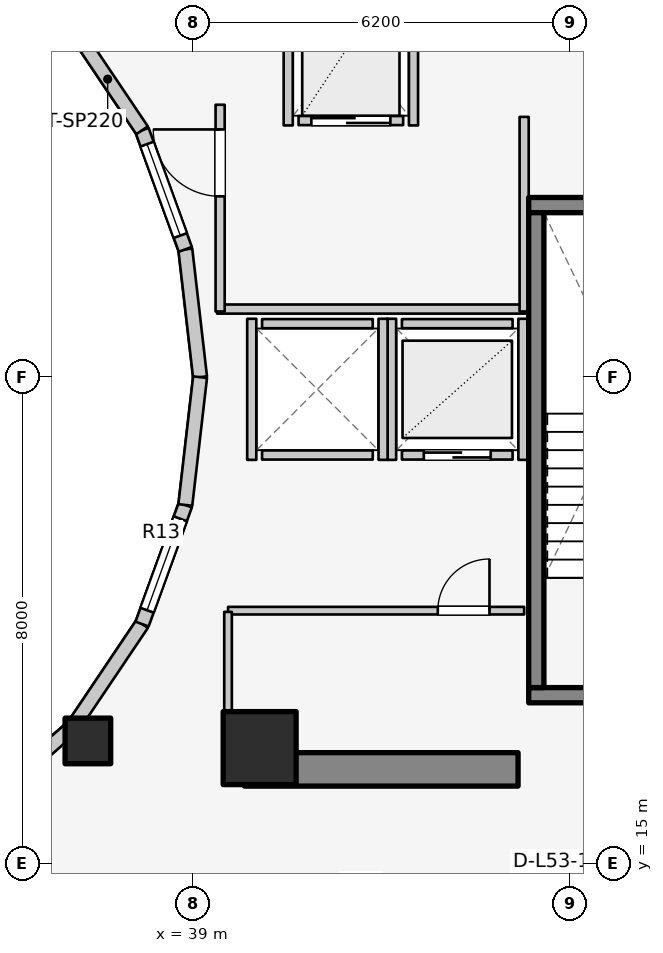
"""IFC4 building model, lengths in metres.
Left out: names, types, materials, properties, quantities, classifications, styles, units other than length and angle.
Written with IfcOpenShell. Run it as: python <this file> out.ifc"""

import sys

from ifc_helpers import new_model, si_unit, direction, frame, frame_2d, origin, origin_2d, place, context, subcontext, project, spatial, rectangle, extrude, element, fill, save


model = new_model("IFC4")
c1 = context("Model", 3, precision=1e-05, world=origin(), true_north=direction((0.0, 1.0)))
c2 = subcontext(c1, "Body", "Model", "MODEL_VIEW")
j1 = project(units=[si_unit("LENGTHUNIT", "METRE"), si_unit("PLANEANGLEUNIT", "RADIAN")], contexts=[c1])
p1 = place(None, origin())
s1 = spatial("IfcSite", under=j1, at=p1, CompositionType="ELEMENT")
p2 = place(p1, origin())
s2 = spatial("IfcBuilding", under=s1, at=p2, CompositionType="ELEMENT")
p3 = place(p2, frame((0.0, 0.0, 174.6)))
s3 = spatial("IfcBuildingStorey", under=s2, at=p3, CompositionType="ELEMENT", Elevation=174.6)
p4 = place(p3, frame((39.85, 16.55, 0.0), z_axis=(0.0, 0.0, 1.0), x_axis=(1.0, 0.0, 0.0)))
e1 = element("IfcWall", 1, at=p4, inside=s3, PredefinedType="SHEAR", context=c2, shape_type="SweptSolid", body=[
    extrude(rectangle(XDim=4.5, YDim=0.55, at=frame_2d((2.25, 0.0))), origin(), (0.0, 0.0, 1.0), 3.1),
])
p5 = place(p3, frame((44.525, 17.77, 0.0), z_axis=(0.0, 0.0, 1.0), x_axis=(1.0, 0.0, 0.0)))
e2 = element("IfcWall", 2, at=p5, inside=s3, PredefinedType="SOLIDWALL", context=c2, shape_type="SweptSolid", body=[
    extrude(rectangle(XDim=3.37, YDim=0.25, at=frame_2d((1.685, 0.0))), origin(), (0.0, 0.0, 1.0), 3.1),
])
p6 = place(p5, frame((1.135, 0.0, 0.0)))
e3 = element("IfcOpeningElement", 3, at=p6, cuts=e2, PredefinedType="OPENING", context=c2, shape_type="SweptSolid", body=[
    extrude(rectangle(XDim=1.1, YDim=2.1, at=frame_2d((0.55, 1.05))), frame((0.0, 0.135, 0.0), z_axis=(0.0, -1.0, 0.0), x_axis=(1.0, 0.0, 0.0)), (0.0, 0.0, 1.0), 0.27),
])
p7 = place(p3, frame((44.525, 25.83, 0.0), z_axis=(0.0, 0.0, 1.0), x_axis=(1.0, 0.0, 0.0)))
e4 = element("IfcWall", 4, at=p7, inside=s3, PredefinedType="SOLIDWALL", context=c2, shape_type="SweptSolid", body=[
    extrude(rectangle(XDim=3.37, YDim=0.25, at=frame_2d((1.685, 0.0))), origin(), (0.0, 0.0, 1.0), 3.1),
])
p8 = place(p3, frame((44.65, 17.895, 0.0), z_axis=(0.0, 0.0, 1.0), x_axis=(0.0, 1.0, 0.0)))
e5 = element("IfcWall", 5, at=p8, inside=s3, PredefinedType="SOLIDWALL", context=c2, shape_type="SweptSolid", body=[
    extrude(rectangle(XDim=7.81, YDim=0.25, at=frame_2d((3.905, 0.0))), origin(), (0.0, 0.0, 1.0), 3.1),
])
p9 = place(p3, frame((40.1, 16.9, 0.0), z_axis=(0.0, 0.0, 1.0), x_axis=(1.0, 0.0, 0.0)))
e6 = element("IfcColumn", 6, at=p9, inside=s3, PredefinedType="COLUMN", context=c2, shape_type="SweptSolid", body=[
    extrude(rectangle(XDim=1.2, YDim=1.2, at=origin_2d()), origin(), (0.0, 0.0, 1.0), 3.1),
])
p10 = place(p3, frame((37.275, 17.018, 0.0), z_axis=(0.0, 0.0, 1.0), x_axis=(1.0, 0.0, 0.0)))
e7 = element("IfcColumn", 7, at=p10, inside=s3, PredefinedType="COLUMN", context=c2, shape_type="SweptSolid", body=[
    extrude(rectangle(XDim=0.75, YDim=0.75, at=origin_2d()), origin(), (0.0, 0.0, 1.0), 3.1),
])
p11 = place(p3, frame((39.12, 23.0, 0.0), z_axis=(0.0, 0.0, 1.0), x_axis=(-0.114711713601, 0.993398823617, 0.0)))
e8 = element("IfcWall", 8, at=p11, inside=s3, PredefinedType="STANDARD", context=c2, shape_type="SweptSolid", body=[
    extrude(rectangle(XDim=2.115, YDim=0.23, at=frame_2d((1.058, 0.0))), origin(), (0.0, 0.0, 1.0), 2.84),
])
p12 = place(p3, frame((38.877, 25.102, 0.0), z_axis=(0.0, 0.0, 1.0), x_axis=(-0.341423187295, 0.93990968033, 0.0)))
e9 = element("IfcWall", 9, at=p12, inside=s3, PredefinedType="STANDARD", context=c2, shape_type="SweptSolid", body=[
    extrude(rectangle(XDim=2.084, YDim=0.23, at=frame_2d((1.042, 0.0))), origin(), (0.0, 0.0, 1.0), 2.84),
])
p13 = place(p12, frame((0.242, 0.0, 0.85)))
e10 = element("IfcOpeningElement", 10, at=p13, cuts=e9, PredefinedType="OPENING", context=c2, shape_type="SweptSolid", body=[
    extrude(rectangle(XDim=1.6, YDim=1.65, at=frame_2d((0.8, 0.825))), frame((0.0, 0.125, 0.0), z_axis=(0.0, -1.0, 0.0), x_axis=(1.0, 0.0, 0.0)), (0.0, 0.0, 1.0), 0.25),
])
p14 = place(p3, frame((38.166, 27.06, 0.0), z_axis=(0.0, 0.0, 1.0), x_axis=(-0.558197800898, 0.829707909492, 0.0)))
e11 = element("IfcWall", 11, at=p14, inside=s3, PredefinedType="STANDARD", context=c2, shape_type="SweptSolid", body=[
    extrude(rectangle(XDim=2.027, YDim=0.23, at=frame_2d((1.013, 0.0))), origin(), (0.0, 0.0, 1.0), 2.16),
])
p15 = place(p3, frame((35.56, 15.968, 0.0), z_axis=(0.0, 0.0, 1.0), x_axis=(0.752576694707, 0.658504607869, 0.0)))
e12 = element("IfcWall", 12, at=p15, inside=s3, PredefinedType="STANDARD", context=c2, shape_type="SweptSolid", body=[
    extrude(rectangle(XDim=1.959, YDim=0.23, at=frame_2d((0.98, 0.0))), origin(), (0.0, 0.0, 1.0), 2.16),
])
p16 = place(p3, frame((37.035, 17.258, 0.0), z_axis=(0.0, 0.0, 1.0), x_axis=(0.558197800898, 0.829707909492, 0.0)))
e13 = element("IfcWall", 13, at=p16, inside=s3, PredefinedType="STANDARD", context=c2, shape_type="SweptSolid", body=[
    extrude(rectangle(XDim=2.027, YDim=0.23, at=frame_2d((1.013, 0.0))), origin(), (0.0, 0.0, 1.0), 2.16),
])
p17 = place(p3, frame((38.166, 18.94, 0.0), z_axis=(0.0, 0.0, 1.0), x_axis=(0.341423187295, 0.93990968033, 0.0)))
e14 = element("IfcWall", 14, at=p17, inside=s3, PredefinedType="STANDARD", context=c2, shape_type="SweptSolid", body=[
    extrude(rectangle(XDim=2.084, YDim=0.23, at=frame_2d((1.042, 0.0))), origin(), (0.0, 0.0, 1.0), 2.84),
])
p18 = place(p17, frame((0.242, 0.0, 0.85)))
e15 = element("IfcOpeningElement", 15, at=p18, cuts=e14, PredefinedType="OPENING", context=c2, shape_type="SweptSolid", body=[
    extrude(rectangle(XDim=1.6, YDim=1.65, at=frame_2d((0.8, 0.825))), frame((0.0, 0.125, 0.0), z_axis=(0.0, -1.0, 0.0), x_axis=(1.0, 0.0, 0.0)), (0.0, 0.0, 1.0), 0.25),
])
p19 = place(p3, frame((38.877, 20.898, 0.0), z_axis=(0.0, 0.0, 1.0), x_axis=(0.114711713601, 0.993398823617, 0.0)))
e16 = element("IfcWall", 16, at=p19, inside=s3, PredefinedType="STANDARD", context=c2, shape_type="SweptSolid", body=[
    extrude(rectangle(XDim=2.115, YDim=0.23, at=frame_2d((1.058, 0.0))), origin(), (0.0, 0.0, 1.0), 2.84),
])
p20 = place(p3, frame((42.44, 21.72, 0.0), z_axis=(0.0, 0.0, 1.0), x_axis=(1.0, 0.0, 0.0)))
e17 = element("IfcWall", 17, at=p20, inside=s3, PredefinedType="SOLIDWALL", context=c2, shape_type="SweptSolid", body=[
    extrude(rectangle(XDim=1.82, YDim=0.15, at=frame_2d((0.91, 0.0))), origin(), (0.0, 0.0, 1.0), 2.855),
])
p21 = place(p20, frame((0.36, 0.0, 0.0)))
e18 = element("IfcOpeningElement", 18, at=p21, cuts=e17, PredefinedType="OPENING", context=c2, shape_type="SweptSolid", body=[
    extrude(rectangle(XDim=1.1, YDim=2.1, at=frame_2d((0.55, 1.05))), frame((0.0, 0.085, 0.0), z_axis=(0.0, -1.0, 0.0), x_axis=(1.0, 0.0, 0.0)), (0.0, 0.0, 1.0), 0.17),
])
p22 = place(p3, frame((42.44, 23.88, 0.0), z_axis=(0.0, 0.0, 1.0), x_axis=(1.0, 0.0, 0.0)))
e19 = element("IfcWall", 19, at=p22, inside=s3, PredefinedType="SOLIDWALL", context=c2, shape_type="SweptSolid", body=[
    extrude(rectangle(XDim=1.82, YDim=0.15, at=frame_2d((0.91, 0.0))), origin(), (0.0, 0.0, 1.0), 2.855),
])
for number, where, z_axis, x_axis in (
    (20, (42.27, 21.64, 0.0), (0.0, 0.0, 1.0), (0.0, 1.0, 0.0)),
    (21, (44.43, 21.64, 0.0), (0.0, 0.0, 1.0), (0.0, 1.0, 0.0)),
):
    element("IfcWall", number, at=place(p3, frame(where, z_axis=z_axis, x_axis=x_axis)), inside=s3, PredefinedType="SOLIDWALL", context=c2, shape_type="SweptSolid", body=[
        extrude(rectangle(XDim=2.32, YDim=0.15, at=frame_2d((1.16, 0.0))), origin(), (0.0, 0.0, 1.0), 2.855),
    ])
for number, where, z_axis, x_axis in (
    (22, (40.14, 21.72, 0.0), (0.0, 0.0, 1.0), (1.0, 0.0, 0.0)),
    (23, (40.14, 23.88, 0.0), (0.0, 0.0, 1.0), (1.0, 0.0, 0.0)),
):
    element("IfcWall", number, at=place(p3, frame(where, z_axis=z_axis, x_axis=x_axis)), inside=s3, PredefinedType="SOLIDWALL", context=c2, shape_type="SweptSolid", body=[
        extrude(rectangle(XDim=1.82, YDim=0.15, at=frame_2d((0.91, 0.0))), origin(), (0.0, 0.0, 1.0), 2.12),
    ])
p23 = place(p3, frame((39.97, 21.64, 0.0), z_axis=(0.0, 0.0, 1.0), x_axis=(0.0, 1.0, 0.0)))
e24 = element("IfcWall", 24, at=p23, inside=s3, PredefinedType="SOLIDWALL", context=c2, shape_type="SweptSolid", body=[
    extrude(rectangle(XDim=2.32, YDim=0.15, at=frame_2d((1.16, 0.0))), origin(), (0.0, 0.0, 1.0), 2.12),
])
p24 = place(p3, frame((42.13, 21.64, 0.0), z_axis=(0.0, 0.0, 1.0), x_axis=(0.0, 1.0, 0.0)))
e25 = element("IfcWall", 25, at=p24, inside=s3, PredefinedType="SOLIDWALL", context=c2, shape_type="SweptSolid", body=[
    extrude(rectangle(XDim=2.32, YDim=0.15, at=frame_2d((1.16, 0.0))), origin(), (0.0, 0.0, 1.0), 2.855),
])
p25 = place(p3, frame((40.74, 27.22, 0.0), z_axis=(0.0, 0.0, 1.0), x_axis=(1.0, 0.0, 0.0)))
e26 = element("IfcWall", 26, at=p25, inside=s3, PredefinedType="SOLIDWALL", context=c2, shape_type="SweptSolid", body=[
    extrude(rectangle(XDim=1.72, YDim=0.15, at=frame_2d((0.86, 0.0))), origin(), (0.0, 0.0, 1.0), 2.855),
])
p26 = place(p25, frame((0.21, 0.0, 0.0)))
e27 = element("IfcOpeningElement", 27, at=p26, cuts=e26, PredefinedType="OPENING", context=c2, shape_type="SweptSolid", body=[
    extrude(rectangle(XDim=1.3, YDim=2.1, at=frame_2d((0.65, 1.05))), frame((0.0, 0.085, 0.0), z_axis=(0.0, -1.0, 0.0), x_axis=(1.0, 0.0, 0.0)), (0.0, 0.0, 1.0), 0.17),
])
for number, where, z_axis, x_axis in (
    (28, (40.57, 27.14, 0.0), (0.0, 0.0, 1.0), (0.0, 1.0, 0.0)),
    (29, (42.63, 27.14, 0.0), (0.0, 0.0, 1.0), (0.0, 1.0, 0.0)),
):
    element("IfcWall", number, at=place(p3, frame(where, z_axis=z_axis, x_axis=x_axis)), inside=s3, PredefinedType="SOLIDWALL", context=c2, shape_type="SweptSolid", body=[
        extrude(rectangle(XDim=2.72, YDim=0.15, at=frame_2d((1.36, 0.0))), origin(), (0.0, 0.0, 1.0), 2.855),
    ])
p27 = place(p3, frame((39.4, 24.12, 0.0), z_axis=(0.0, 0.0, 1.0), x_axis=(1.0, 0.0, 0.0)))
e30 = element("IfcWall", 30, at=p27, inside=s3, PredefinedType="PARTITIONING", context=c2, shape_type="SweptSolid", body=[
    extrude(rectangle(XDim=5.08, YDim=0.15, at=frame_2d((2.54, 0.0))), origin(), (0.0, 0.0, 1.0), 2.12),
])
p28 = place(p3, frame((44.45, 24.08, 0.0), z_axis=(0.0, 0.0, 1.0), x_axis=(0.0, 1.0, 0.0)))
e31 = element("IfcWall", 31, at=p28, inside=s3, PredefinedType="PARTITIONING", context=c2, shape_type="SweptSolid", body=[
    extrude(rectangle(XDim=3.2, YDim=0.15, at=frame_2d((1.6, 0.0))), origin(), (0.0, 0.0, 1.0), 2.855),
])
p29 = place(p3, frame((39.45, 24.08, 0.0), z_axis=(0.0, 0.0, 1.0), x_axis=(0.0, 1.0, 0.0)))
e32 = element("IfcWall", 32, at=p29, inside=s3, PredefinedType="PARTITIONING", context=c2, shape_type="SweptSolid", body=[
    extrude(rectangle(XDim=3.4, YDim=0.15, at=frame_2d((1.7, 0.0))), origin(), (0.0, 0.0, 1.0), 2.855),
])
p30 = place(p29, frame((1.894, 0.0, 0.0)))
e33 = element("IfcOpeningElement", 33, at=p30, cuts=e32, PredefinedType="OPENING", context=c2, shape_type="SweptSolid", body=[
    extrude(rectangle(XDim=1.1, YDim=2.1, at=frame_2d((0.55, 1.05))), frame((0.0, 0.085, 0.0), z_axis=(0.0, -1.0, 0.0), x_axis=(1.0, 0.0, 0.0)), (0.0, 0.0, 1.0), 0.17),
])
p31 = place(p3, frame((39.58, 19.16, 0.0), z_axis=(0.0, 0.0, 1.0), x_axis=(1.0, 0.0, 0.0)))
e34 = element("IfcWall", 34, at=p31, inside=s3, PredefinedType="PARTITIONING", context=c2, shape_type="SweptSolid", body=[
    extrude(rectangle(XDim=4.87, YDim=0.125, at=frame_2d((2.435, 0.0))), origin(), (0.0, 0.0, 1.0), 2.12),
])
p32 = place(p31, frame((3.45, 0.0, 0.0)))
e35 = element("IfcOpeningElement", 35, at=p32, cuts=e34, PredefinedType="OPENING", context=c2, shape_type="SweptSolid", body=[
    extrude(rectangle(XDim=0.85, YDim=2.05, at=frame_2d((0.425, 1.025))), frame((0.0, 0.073, 0.0), z_axis=(0.0, -1.0, 0.0), x_axis=(1.0, 0.0, 0.0)), (0.0, 0.0, 1.0), 0.145),
])
p33 = place(p3, frame((39.58, 17.1, 0.0), z_axis=(0.0, 0.0, 1.0), x_axis=(0.0, 1.0, 0.0)))
e36 = element("IfcWall", 36, at=p33, inside=s3, PredefinedType="PARTITIONING", context=c2, shape_type="SweptSolid", body=[
    extrude(rectangle(XDim=2.04, YDim=0.125, at=frame_2d((1.02, 0.0))), origin(), (0.0, 0.0, 1.0), 2.232),
])
p34 = place(p3, frame((35.55, 15.985, 0.0), z_axis=(0.0, 0.0, 1.0), x_axis=(0.523587550846, -0.851971875474, 0.0)))
e37 = element("IfcWall", 37, at=p34, inside=s3, PredefinedType="PARTITIONING", context=c2, shape_type="SweptSolid", body=[
    extrude(rectangle(XDim=3.153, YDim=0.125, at=frame_2d((1.577, 0.0))), origin(), (0.0, 0.0, 1.0), 2.299),
])
p35 = place(p13, origin())
e38 = element("IfcWindow", 38, at=p35, inside=s3, PartitioningType="SINGLE_PANEL", PredefinedType="WINDOW", context=c2, shape_type="SweptSolid", body=[
    extrude(rectangle(XDim=1.6, YDim=1.65, at=frame_2d((0.8, 0.825))), frame((0.0, 0.03, 0.0), z_axis=(0.0, -1.0, 0.0), x_axis=(1.0, 0.0, 0.0)), (0.0, 0.0, 1.0), 0.06),
])
fill(e10, e38)
p36 = place(p18, origin())
e39 = element("IfcWindow", 39, at=p36, inside=s3, PartitioningType="SINGLE_PANEL", PredefinedType="WINDOW", context=c2, shape_type="SweptSolid", body=[
    extrude(rectangle(XDim=1.6, YDim=1.65, at=frame_2d((0.8, 0.825))), frame((0.0, 0.03, 0.0), z_axis=(0.0, -1.0, 0.0), x_axis=(1.0, 0.0, 0.0)), (0.0, 0.0, 1.0), 0.06),
])
fill(e15, e39)
p37 = place(p21, origin())
e40 = element("IfcDoor", 40, at=p37, inside=s3, OperationType="DOUBLE_DOOR_SLIDING", PredefinedType="DOOR", context=c2, shape_type="SweptSolid", body=[
    extrude(rectangle(XDim=1.1, YDim=2.1, at=frame_2d((0.55, 1.05))), frame((0.0, 0.025, 0.0), z_axis=(0.0, -1.0, 0.0), x_axis=(1.0, 0.0, 0.0)), (0.0, 0.0, 1.0), 0.05),
])
fill(e18, e40)
p38 = place(p26, origin())
e41 = element("IfcDoor", 41, at=p38, inside=s3, OperationType="DOUBLE_DOOR_SLIDING", PredefinedType="DOOR", context=c2, shape_type="SweptSolid", body=[
    extrude(rectangle(XDim=1.3, YDim=2.1, at=frame_2d((0.65, 1.05))), frame((0.0, 0.025, 0.0), z_axis=(0.0, -1.0, 0.0), x_axis=(1.0, 0.0, 0.0)), (0.0, 0.0, 1.0), 0.05),
])
fill(e27, e41)
p39 = place(p30, origin())
e42 = element("IfcDoor", 42, at=p39, inside=s3, OperationType="SINGLE_SWING_RIGHT", PredefinedType="DOOR", context=c2, shape_type="SweptSolid", body=[
    extrude(rectangle(XDim=1.1, YDim=2.1, at=frame_2d((0.55, 1.05))), frame((0.0, 0.025, 0.0), z_axis=(0.0, -1.0, 0.0), x_axis=(1.0, 0.0, 0.0)), (0.0, 0.0, 1.0), 0.05),
])
fill(e33, e42)
p40 = place(p32, origin())
e43 = element("IfcDoor", 43, at=p40, inside=s3, OperationType="SINGLE_SWING_RIGHT", PredefinedType="DOOR", context=c2, shape_type="SweptSolid", body=[
    extrude(rectangle(XDim=0.85, YDim=2.05, at=frame_2d((0.425, 1.025))), frame((0.0, 0.025, 0.0), z_axis=(0.0, -1.0, 0.0), x_axis=(1.0, 0.0, 0.0)), (0.0, 0.0, 1.0), 0.05),
])
fill(e35, e43)
save(model, sys.argv[1])
